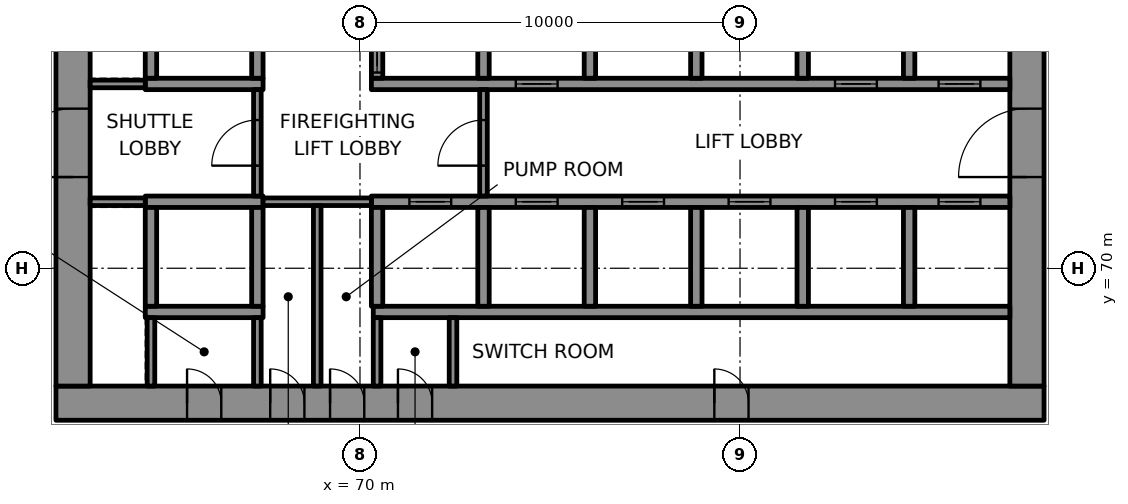
"""IFC4 building model, lengths in metres.
Left out: names, types, materials, properties, quantities, classifications, styles, units other than length and angle.
Written with IfcOpenShell. Run it as: python <this file> out.ifc"""

import sys

from ifc_helpers import new_model, si_unit, direction, frame, frame_2d, origin, place, context, subcontext, project, spatial, rectangle, extrude, element, fill, save


model = new_model("IFC4")
c1 = context("Model", 3, precision=1e-05, world=origin(), true_north=direction((0.0, 1.0)))
c2 = subcontext(c1, "Body", "Model", "MODEL_VIEW")
j1 = project(units=[si_unit("LENGTHUNIT", "METRE"), si_unit("PLANEANGLEUNIT", "RADIAN")], contexts=[c1])
p1 = place(None, origin())
s1 = spatial("IfcSite", under=j1, at=p1, CompositionType="ELEMENT")
p2 = place(p1, origin())
s2 = spatial("IfcBuilding", under=s1, at=p2, CompositionType="ELEMENT")
p3 = place(p2, frame((0.0, 0.0, 107.2)))
s3 = spatial("IfcBuildingStorey", under=s2, at=p3, CompositionType="ELEMENT", Elevation=107.2)
p4 = place(p3, frame((62.0, 66.45, 0.0), z_axis=(0.0, 0.0, 1.0), x_axis=(1.0, 0.0, 0.0)))
e1 = element("IfcWall", 1, at=p4, inside=s3, PredefinedType="SHEAR", context=c2, shape_type="SweptSolid", body=[
    extrude(rectangle(XDim=26.0, YDim=0.9, at=frame_2d((13.0, 0.0))), origin(), (0.0, 0.0, 1.0), 4.0),
])
p5 = place(p4, frame((3.45, 0.0, 0.0)))
e2 = element("IfcOpeningElement", 2, at=p5, cuts=e1, PredefinedType="OPENING", context=c2, shape_type="SweptSolid", body=[
    extrude(rectangle(XDim=0.9, YDim=2.1, at=frame_2d((0.45, 1.05))), frame((0.0, 0.46, 0.0), z_axis=(0.0, -1.0, 0.0), x_axis=(1.0, 0.0, 0.0)), (0.0, 0.0, 1.0), 0.92),
])
p6 = place(p4, frame((5.637, 0.0, 0.0)))
e3 = element("IfcOpeningElement", 3, at=p6, cuts=e1, PredefinedType="OPENING", context=c2, shape_type="SweptSolid", body=[
    extrude(rectangle(XDim=0.9, YDim=2.1, at=frame_2d((0.45, 1.05))), frame((0.0, 0.46, 0.0), z_axis=(0.0, -1.0, 0.0), x_axis=(1.0, 0.0, 0.0)), (0.0, 0.0, 1.0), 0.92),
])
p7 = place(p4, frame((7.212, 0.0, 0.0)))
e4 = element("IfcOpeningElement", 4, at=p7, cuts=e1, PredefinedType="OPENING", context=c2, shape_type="SweptSolid", body=[
    extrude(rectangle(XDim=0.9, YDim=2.1, at=frame_2d((0.45, 1.05))), frame((0.0, 0.46, 0.0), z_axis=(0.0, -1.0, 0.0), x_axis=(1.0, 0.0, 0.0)), (0.0, 0.0, 1.0), 0.92),
])
p8 = place(p4, frame((8.999, 0.0, 0.0)))
e5 = element("IfcOpeningElement", 5, at=p8, cuts=e1, PredefinedType="OPENING", context=c2, shape_type="SweptSolid", body=[
    extrude(rectangle(XDim=0.9, YDim=2.1, at=frame_2d((0.45, 1.05))), frame((0.0, 0.46, 0.0), z_axis=(0.0, -1.0, 0.0), x_axis=(1.0, 0.0, 0.0)), (0.0, 0.0, 1.0), 0.92),
])
p9 = place(p4, frame((17.324, 0.0, 0.0)))
e6 = element("IfcOpeningElement", 6, at=p9, cuts=e1, PredefinedType="OPENING", context=c2, shape_type="SweptSolid", body=[
    extrude(rectangle(XDim=0.9, YDim=2.1, at=frame_2d((0.45, 1.05))), frame((0.0, 0.46, 0.0), z_axis=(0.0, -1.0, 0.0), x_axis=(1.0, 0.0, 0.0)), (0.0, 0.0, 1.0), 0.92),
])
p10 = place(p3, frame((62.45, 66.9, 0.0), z_axis=(0.0, 0.0, 1.0), x_axis=(0.0, 1.0, 0.0)))
e7 = element("IfcWall", 7, at=p10, inside=s3, PredefinedType="SHEAR", context=c2, shape_type="SweptSolid", body=[
    extrude(rectangle(XDim=16.2, YDim=0.9, at=frame_2d((8.1, 0.0))), origin(), (0.0, 0.0, 1.0), 4.0),
])
p11 = place(p10, frame((5.5, 0.0, 0.0)))
e8 = element("IfcOpeningElement", 8, at=p11, cuts=e7, PredefinedType="OPENING", context=c2, shape_type="SweptSolid", body=[
    extrude(rectangle(XDim=1.8, YDim=2.1, at=frame_2d((0.9, 1.05))), frame((0.0, 0.46, 0.0), z_axis=(0.0, -1.0, 0.0), x_axis=(1.0, 0.0, 0.0)), (0.0, 0.0, 1.0), 0.92),
])
p12 = place(p3, frame((87.55, 66.9, 0.0), z_axis=(0.0, 0.0, 1.0), x_axis=(0.0, 1.0, 0.0)))
e9 = element("IfcWall", 9, at=p12, inside=s3, PredefinedType="SHEAR", context=c2, shape_type="SweptSolid", body=[
    extrude(rectangle(XDim=16.2, YDim=0.9, at=frame_2d((8.1, 0.0))), origin(), (0.0, 0.0, 1.0), 4.0),
])
p13 = place(p12, frame((5.5, 0.0, 0.0)))
e10 = element("IfcOpeningElement", 10, at=p13, cuts=e9, PredefinedType="OPENING", context=c2, shape_type="SweptSolid", body=[
    extrude(rectangle(XDim=1.8, YDim=2.1, at=frame_2d((0.9, 1.05))), frame((0.0, 0.46, 0.0), z_axis=(0.0, -1.0, 0.0), x_axis=(1.0, 0.0, 0.0)), (0.0, 0.0, 1.0), 0.92),
])
p14 = place(p12, frame((11.202, 0.0, 0.0)))
e11 = element("IfcOpeningElement", 11, at=p14, cuts=e9, PredefinedType="OPENING", context=c2, shape_type="SweptSolid", body=[
    extrude(rectangle(XDim=0.9, YDim=2.1, at=frame_2d((0.45, 1.05))), frame((0.0, 0.46, 0.0), z_axis=(0.0, -1.0, 0.0), x_axis=(1.0, 0.0, 0.0)), (0.0, 0.0, 1.0), 0.92),
])
p15 = place(p3, frame((64.35, 68.85, 0.0), z_axis=(0.0, 0.0, 1.0), x_axis=(1.0, 0.0, 0.0)))
e12 = element("IfcWall", 12, at=p15, inside=s3, PredefinedType="SHEAR", context=c2, shape_type="SweptSolid", body=[
    extrude(rectangle(XDim=3.1, YDim=0.3, at=frame_2d((1.55, 0.0))), origin(), (0.0, 0.0, 1.0), 4.0),
])
p16 = place(p3, frame((70.35, 68.85, 0.0), z_axis=(0.0, 0.0, 1.0), x_axis=(1.0, 0.0, 0.0)))
e13 = element("IfcWall", 13, at=p16, inside=s3, PredefinedType="SHEAR", context=c2, shape_type="SweptSolid", body=[
    extrude(rectangle(XDim=16.75, YDim=0.3, at=frame_2d((8.375, 0.0))), origin(), (0.0, 0.0, 1.0), 4.0),
])
p17 = place(p3, frame((64.35, 71.75, 0.0), z_axis=(0.0, 0.0, 1.0), x_axis=(1.0, 0.0, 0.0)))
e14 = element("IfcWall", 14, at=p17, inside=s3, PredefinedType="SHEAR", context=c2, shape_type="SweptSolid", body=[
    extrude(rectangle(XDim=3.1, YDim=0.3, at=frame_2d((1.55, 0.0))), origin(), (0.0, 0.0, 1.0), 4.0),
])
p18 = place(p3, frame((70.3, 71.75, 0.0), z_axis=(0.0, 0.0, 1.0), x_axis=(1.0, 0.0, 0.0)))
e15 = element("IfcWall", 15, at=p18, inside=s3, PredefinedType="SHEAR", context=c2, shape_type="SweptSolid", body=[
    extrude(rectangle(XDim=16.8, YDim=0.3, at=frame_2d((8.4, 0.0))), origin(), (0.0, 0.0, 1.0), 4.0),
])
p19 = place(p18, frame((1.0, 0.0, 0.0)))
e16 = element("IfcOpeningElement", 16, at=p19, cuts=e15, PredefinedType="OPENING", context=c2, shape_type="SweptSolid", body=[
    extrude(rectangle(XDim=1.1, YDim=2.1, at=frame_2d((0.55, 1.05))), frame((0.0, 0.16, 0.0), z_axis=(0.0, -1.0, 0.0), x_axis=(1.0, 0.0, 0.0)), (0.0, 0.0, 1.0), 0.32),
])
p20 = place(p18, frame((3.8, 0.0, 0.0)))
e17 = element("IfcOpeningElement", 17, at=p20, cuts=e15, PredefinedType="OPENING", context=c2, shape_type="SweptSolid", body=[
    extrude(rectangle(XDim=1.1, YDim=2.1, at=frame_2d((0.55, 1.05))), frame((0.0, 0.16, 0.0), z_axis=(0.0, -1.0, 0.0), x_axis=(1.0, 0.0, 0.0)), (0.0, 0.0, 1.0), 0.32),
])
p21 = place(p18, frame((6.6, 0.0, 0.0)))
e18 = element("IfcOpeningElement", 18, at=p21, cuts=e15, PredefinedType="OPENING", context=c2, shape_type="SweptSolid", body=[
    extrude(rectangle(XDim=1.1, YDim=2.1, at=frame_2d((0.55, 1.05))), frame((0.0, 0.16, 0.0), z_axis=(0.0, -1.0, 0.0), x_axis=(1.0, 0.0, 0.0)), (0.0, 0.0, 1.0), 0.32),
])
p22 = place(p18, frame((9.4, 0.0, 0.0)))
e19 = element("IfcOpeningElement", 19, at=p22, cuts=e15, PredefinedType="OPENING", context=c2, shape_type="SweptSolid", body=[
    extrude(rectangle(XDim=1.1, YDim=2.1, at=frame_2d((0.55, 1.05))), frame((0.0, 0.16, 0.0), z_axis=(0.0, -1.0, 0.0), x_axis=(1.0, 0.0, 0.0)), (0.0, 0.0, 1.0), 0.32),
])
p23 = place(p18, frame((12.2, 0.0, 0.0)))
e20 = element("IfcOpeningElement", 20, at=p23, cuts=e15, PredefinedType="OPENING", context=c2, shape_type="SweptSolid", body=[
    extrude(rectangle(XDim=1.1, YDim=2.1, at=frame_2d((0.55, 1.05))), frame((0.0, 0.16, 0.0), z_axis=(0.0, -1.0, 0.0), x_axis=(1.0, 0.0, 0.0)), (0.0, 0.0, 1.0), 0.32),
])
p24 = place(p18, frame((14.925, 0.0, 0.0)))
e21 = element("IfcOpeningElement", 21, at=p24, cuts=e15, PredefinedType="OPENING", context=c2, shape_type="SweptSolid", body=[
    extrude(rectangle(XDim=1.1, YDim=2.1, at=frame_2d((0.55, 1.05))), frame((0.0, 0.16, 0.0), z_axis=(0.0, -1.0, 0.0), x_axis=(1.0, 0.0, 0.0)), (0.0, 0.0, 1.0), 0.32),
])
p25 = place(p3, frame((64.35, 74.85, 0.0), z_axis=(0.0, 0.0, 1.0), x_axis=(1.0, 0.0, 0.0)))
e22 = element("IfcWall", 22, at=p25, inside=s3, PredefinedType="SHEAR", context=c2, shape_type="SweptSolid", body=[
    extrude(rectangle(XDim=3.1, YDim=0.3, at=frame_2d((1.55, 0.0))), origin(), (0.0, 0.0, 1.0), 4.0),
])
p26 = place(p3, frame((70.3, 74.85, 0.0), z_axis=(0.0, 0.0, 1.0), x_axis=(1.0, 0.0, 0.0)))
e23 = element("IfcWall", 23, at=p26, inside=s3, PredefinedType="SHEAR", context=c2, shape_type="SweptSolid", body=[
    extrude(rectangle(XDim=16.8, YDim=0.3, at=frame_2d((8.4, 0.0))), origin(), (0.0, 0.0, 1.0), 4.0),
])
p27 = place(p26, frame((3.8, 0.0, 0.0)))
e24 = element("IfcOpeningElement", 24, at=p27, cuts=e23, PredefinedType="OPENING", context=c2, shape_type="SweptSolid", body=[
    extrude(rectangle(XDim=1.1, YDim=2.1, at=frame_2d((0.55, 1.05))), frame((0.0, 0.16, 0.0), z_axis=(0.0, -1.0, 0.0), x_axis=(1.0, 0.0, 0.0)), (0.0, 0.0, 1.0), 0.32),
])
p28 = place(p26, frame((12.2, 0.0, 0.0)))
e25 = element("IfcOpeningElement", 25, at=p28, cuts=e23, PredefinedType="OPENING", context=c2, shape_type="SweptSolid", body=[
    extrude(rectangle(XDim=1.1, YDim=2.1, at=frame_2d((0.55, 1.05))), frame((0.0, 0.16, 0.0), z_axis=(0.0, -1.0, 0.0), x_axis=(1.0, 0.0, 0.0)), (0.0, 0.0, 1.0), 0.32),
])
p29 = place(p26, frame((14.925, 0.0, 0.0)))
e26 = element("IfcOpeningElement", 26, at=p29, cuts=e23, PredefinedType="OPENING", context=c2, shape_type="SweptSolid", body=[
    extrude(rectangle(XDim=1.1, YDim=2.1, at=frame_2d((0.55, 1.05))), frame((0.0, 0.16, 0.0), z_axis=(0.0, -1.0, 0.0), x_axis=(1.0, 0.0, 0.0)), (0.0, 0.0, 1.0), 0.32),
])
for number, where, z_axis, x_axis in (
    (27, (64.5, 69.0, 0.0), (0.0, 0.0, 1.0), (0.0, 1.0, 0.0)),
    (28, (64.5, 75.0, 0.0), (0.0, 0.0, 1.0), (0.0, 1.0, 0.0)),
    (29, (67.3, 69.0, 0.0), (0.0, 0.0, 1.0), (0.0, 1.0, 0.0)),
    (30, (67.3, 75.0, 0.0), (0.0, 0.0, 1.0), (0.0, 1.0, 0.0)),
    (31, (70.45, 69.0, 0.0), (0.0, 0.0, 1.0), (0.0, 1.0, 0.0)),
):
    element("IfcWall", number, at=place(p3, frame(where, z_axis=z_axis, x_axis=x_axis)), inside=s3, PredefinedType="SHEAR", context=c2, shape_type="SweptSolid", body=[
        extrude(rectangle(XDim=2.6, YDim=0.3, at=frame_2d((1.3, 0.0))), origin(), (0.0, 0.0, 1.0), 4.0),
    ])
p30 = place(p3, frame((70.45, 75.0, 0.0), z_axis=(0.0, 0.0, 1.0), x_axis=(0.0, 1.0, 0.0)))
e32 = element("IfcWall", 32, at=p30, inside=s3, PredefinedType="SHEAR", context=c2, shape_type="SweptSolid", body=[
    extrude(rectangle(XDim=2.6, YDim=0.3, at=frame_2d((1.3, 0.0))), origin(), (0.0, 0.0, 1.0), 4.0),
])
p31 = place(p30, frame((0.15, 0.0, 0.0)))
e33 = element("IfcOpeningElement", 33, at=p31, cuts=e32, PredefinedType="OPENING", context=c2, shape_type="SweptSolid", body=[
    extrude(rectangle(XDim=1.1, YDim=2.1, at=frame_2d((0.55, 1.05))), frame((0.0, 0.16, 0.0), z_axis=(0.0, -1.0, 0.0), x_axis=(1.0, 0.0, 0.0)), (0.0, 0.0, 1.0), 0.32),
])
for number, where, z_axis, x_axis in (
    (34, (73.25, 69.0, 0.0), (0.0, 0.0, 1.0), (0.0, 1.0, 0.0)),
    (35, (73.25, 75.0, 0.0), (0.0, 0.0, 1.0), (0.0, 1.0, 0.0)),
    (36, (76.05, 69.0, 0.0), (0.0, 0.0, 1.0), (0.0, 1.0, 0.0)),
    (37, (76.05, 75.0, 0.0), (0.0, 0.0, 1.0), (0.0, 1.0, 0.0)),
    (38, (78.85, 69.0, 0.0), (0.0, 0.0, 1.0), (0.0, 1.0, 0.0)),
    (39, (78.85, 75.0, 0.0), (0.0, 0.0, 1.0), (0.0, 1.0, 0.0)),
    (40, (81.65, 69.0, 0.0), (0.0, 0.0, 1.0), (0.0, 1.0, 0.0)),
    (41, (81.65, 75.0, 0.0), (0.0, 0.0, 1.0), (0.0, 1.0, 0.0)),
    (42, (84.45, 69.0, 0.0), (0.0, 0.0, 1.0), (0.0, 1.0, 0.0)),
    (43, (84.45, 75.0, 0.0), (0.0, 0.0, 1.0), (0.0, 1.0, 0.0)),
):
    element("IfcWall", number, at=place(p3, frame(where, z_axis=z_axis, x_axis=x_axis)), inside=s3, PredefinedType="SHEAR", context=c2, shape_type="SweptSolid", body=[
        extrude(rectangle(XDim=2.6, YDim=0.3, at=frame_2d((1.3, 0.0))), origin(), (0.0, 0.0, 1.0), 4.0),
    ])
p32 = place(p3, frame((62.9, 71.75, 0.0), z_axis=(0.0, 0.0, 1.0), x_axis=(1.0, 0.0, 0.0)))
e44 = element("IfcWall", 44, at=p32, inside=s3, PredefinedType="PARTITIONING", context=c2, shape_type="SweptSolid", body=[
    extrude(rectangle(XDim=1.45, YDim=0.2, at=frame_2d((0.725, 0.0))), origin(), (0.0, 0.0, 1.0), 4.0),
])
p33 = place(p3, frame((67.45, 71.75, 0.0), z_axis=(0.0, 0.0, 1.0), x_axis=(1.0, 0.0, 0.0)))
e45 = element("IfcWall", 45, at=p33, inside=s3, PredefinedType="PARTITIONING", context=c2, shape_type="SweptSolid", body=[
    extrude(rectangle(XDim=2.85, YDim=0.2, at=frame_2d((1.425, 0.0))), origin(), (0.0, 0.0, 1.0), 4.0),
])
p34 = place(p3, frame((62.9, 74.85, 0.0), z_axis=(0.0, 0.0, 1.0), x_axis=(1.0, 0.0, 0.0)))
e46 = element("IfcWall", 46, at=p34, inside=s3, PredefinedType="PARTITIONING", context=c2, shape_type="SweptSolid", body=[
    extrude(rectangle(XDim=1.45, YDim=0.2, at=frame_2d((0.725, 0.0))), origin(), (0.0, 0.0, 1.0), 4.0),
])
for number, where, z_axis, x_axis in (
    (47, (64.5, 66.9, 0.0), (0.0, 0.0, 1.0), (0.0, 1.0, 0.0)),
    (48, (67.3, 66.9, 0.0), (0.0, 0.0, 1.0), (0.0, 1.0, 0.0)),
):
    element("IfcWall", number, at=place(p3, frame(where, z_axis=z_axis, x_axis=x_axis)), inside=s3, PredefinedType="PARTITIONING", context=c2, shape_type="SweptSolid", body=[
        extrude(rectangle(XDim=1.8, YDim=0.2, at=frame_2d((0.9, 0.0))), origin(), (0.0, 0.0, 1.0), 4.0),
    ])
p35 = place(p3, frame((67.3, 71.9, 0.0), z_axis=(0.0, 0.0, 1.0), x_axis=(0.0, 1.0, 0.0)))
e49 = element("IfcWall", 49, at=p35, inside=s3, PredefinedType="PARTITIONING", context=c2, shape_type="SweptSolid", body=[
    extrude(rectangle(XDim=2.8, YDim=0.2, at=frame_2d((1.4, 0.0))), origin(), (0.0, 0.0, 1.0), 4.0),
])
p36 = place(p35, frame((0.8, 0.0, 0.0)))
e50 = element("IfcOpeningElement", 50, at=p36, cuts=e49, PredefinedType="OPENING", context=c2, shape_type="SweptSolid", body=[
    extrude(rectangle(XDim=1.2, YDim=2.1, at=frame_2d((0.6, 1.05))), frame((0.0, 0.11, 0.0), z_axis=(0.0, -1.0, 0.0), x_axis=(1.0, 0.0, 0.0)), (0.0, 0.0, 1.0), 0.22),
])
p37 = place(p3, frame((68.875, 66.9, 0.0), z_axis=(0.0, 0.0, 1.0), x_axis=(0.0, 1.0, 0.0)))
e51 = element("IfcWall", 51, at=p37, inside=s3, PredefinedType="PARTITIONING", context=c2, shape_type="SweptSolid", body=[
    extrude(rectangle(XDim=4.75, YDim=0.2, at=frame_2d((2.375, 0.0))), origin(), (0.0, 0.0, 1.0), 4.0),
])
for number, where, z_axis, x_axis in (
    (52, (70.45, 66.9, 0.0), (0.0, 0.0, 1.0), (0.0, 1.0, 0.0)),
    (53, (72.448, 66.9, 0.0), (0.0, 0.0, 1.0), (0.0, 1.0, 0.0)),
):
    element("IfcWall", number, at=place(p3, frame(where, z_axis=z_axis, x_axis=x_axis)), inside=s3, PredefinedType="PARTITIONING", context=c2, shape_type="SweptSolid", body=[
        extrude(rectangle(XDim=1.8, YDim=0.2, at=frame_2d((0.9, 0.0))), origin(), (0.0, 0.0, 1.0), 4.0),
    ])
p38 = place(p3, frame((73.25, 71.9, 0.0), z_axis=(0.0, 0.0, 1.0), x_axis=(0.0, 1.0, 0.0)))
e54 = element("IfcWall", 54, at=p38, inside=s3, PredefinedType="PARTITIONING", context=c2, shape_type="SweptSolid", body=[
    extrude(rectangle(XDim=2.8, YDim=0.2, at=frame_2d((1.4, 0.0))), origin(), (0.0, 0.0, 1.0), 4.0),
])
p39 = place(p38, frame((0.8, 0.0, 0.0)))
e55 = element("IfcOpeningElement", 55, at=p39, cuts=e54, PredefinedType="OPENING", context=c2, shape_type="SweptSolid", body=[
    extrude(rectangle(XDim=1.2, YDim=2.1, at=frame_2d((0.6, 1.05))), frame((0.0, 0.11, 0.0), z_axis=(0.0, -1.0, 0.0), x_axis=(1.0, 0.0, 0.0)), (0.0, 0.0, 1.0), 0.22),
])
p40 = place(p19, origin())
e56 = element("IfcDoor", 56, at=p40, inside=s3, OperationType="DOUBLE_DOOR_SLIDING", PredefinedType="DOOR", context=c2, shape_type="SweptSolid", body=[
    extrude(rectangle(XDim=1.1, YDim=2.1, at=frame_2d((0.55, 1.05))), frame((0.0, 0.025, 0.0), z_axis=(0.0, -1.0, 0.0), x_axis=(1.0, 0.0, 0.0)), (0.0, 0.0, 1.0), 0.05),
])
fill(e16, e56)
p41 = place(p20, origin())
e57 = element("IfcDoor", 57, at=p41, inside=s3, OperationType="DOUBLE_DOOR_SLIDING", PredefinedType="DOOR", context=c2, shape_type="SweptSolid", body=[
    extrude(rectangle(XDim=1.1, YDim=2.1, at=frame_2d((0.55, 1.05))), frame((0.0, 0.025, 0.0), z_axis=(0.0, -1.0, 0.0), x_axis=(1.0, 0.0, 0.0)), (0.0, 0.0, 1.0), 0.05),
])
fill(e17, e57)
p42 = place(p21, origin())
e58 = element("IfcDoor", 58, at=p42, inside=s3, OperationType="DOUBLE_DOOR_SLIDING", PredefinedType="DOOR", context=c2, shape_type="SweptSolid", body=[
    extrude(rectangle(XDim=1.1, YDim=2.1, at=frame_2d((0.55, 1.05))), frame((0.0, 0.025, 0.0), z_axis=(0.0, -1.0, 0.0), x_axis=(1.0, 0.0, 0.0)), (0.0, 0.0, 1.0), 0.05),
])
fill(e18, e58)
p43 = place(p22, origin())
e59 = element("IfcDoor", 59, at=p43, inside=s3, OperationType="DOUBLE_DOOR_SLIDING", PredefinedType="DOOR", context=c2, shape_type="SweptSolid", body=[
    extrude(rectangle(XDim=1.1, YDim=2.1, at=frame_2d((0.55, 1.05))), frame((0.0, 0.025, 0.0), z_axis=(0.0, -1.0, 0.0), x_axis=(1.0, 0.0, 0.0)), (0.0, 0.0, 1.0), 0.05),
])
fill(e19, e59)
p44 = place(p23, origin())
e60 = element("IfcDoor", 60, at=p44, inside=s3, OperationType="DOUBLE_DOOR_SLIDING", PredefinedType="DOOR", context=c2, shape_type="SweptSolid", body=[
    extrude(rectangle(XDim=1.1, YDim=2.1, at=frame_2d((0.55, 1.05))), frame((0.0, 0.025, 0.0), z_axis=(0.0, -1.0, 0.0), x_axis=(1.0, 0.0, 0.0)), (0.0, 0.0, 1.0), 0.05),
])
fill(e20, e60)
p45 = place(p24, origin())
e61 = element("IfcDoor", 61, at=p45, inside=s3, OperationType="DOUBLE_DOOR_SLIDING", PredefinedType="DOOR", context=c2, shape_type="SweptSolid", body=[
    extrude(rectangle(XDim=1.1, YDim=2.1, at=frame_2d((0.55, 1.05))), frame((0.0, 0.025, 0.0), z_axis=(0.0, -1.0, 0.0), x_axis=(1.0, 0.0, 0.0)), (0.0, 0.0, 1.0), 0.05),
])
fill(e21, e61)
p46 = place(p31, origin())
e62 = element("IfcDoor", 62, at=p46, inside=s3, OperationType="DOUBLE_DOOR_SLIDING", PredefinedType="DOOR", context=c2, shape_type="SweptSolid", body=[
    extrude(rectangle(XDim=1.1, YDim=2.1, at=frame_2d((0.55, 1.05))), frame((0.0, 0.025, 0.0), z_axis=(0.0, -1.0, 0.0), x_axis=(1.0, 0.0, 0.0)), (0.0, 0.0, 1.0), 0.05),
])
fill(e33, e62)
p47 = place(p27, origin())
e63 = element("IfcDoor", 63, at=p47, inside=s3, OperationType="DOUBLE_DOOR_SLIDING", PredefinedType="DOOR", context=c2, shape_type="SweptSolid", body=[
    extrude(rectangle(XDim=1.1, YDim=2.1, at=frame_2d((0.55, 1.05))), frame((0.0, 0.025, 0.0), z_axis=(0.0, -1.0, 0.0), x_axis=(1.0, 0.0, 0.0)), (0.0, 0.0, 1.0), 0.05),
])
fill(e24, e63)
p48 = place(p28, origin())
e64 = element("IfcDoor", 64, at=p48, inside=s3, OperationType="DOUBLE_DOOR_SLIDING", PredefinedType="DOOR", context=c2, shape_type="SweptSolid", body=[
    extrude(rectangle(XDim=1.1, YDim=2.1, at=frame_2d((0.55, 1.05))), frame((0.0, 0.025, 0.0), z_axis=(0.0, -1.0, 0.0), x_axis=(1.0, 0.0, 0.0)), (0.0, 0.0, 1.0), 0.05),
])
fill(e25, e64)
p49 = place(p29, origin())
e65 = element("IfcDoor", 65, at=p49, inside=s3, OperationType="DOUBLE_DOOR_SLIDING", PredefinedType="DOOR", context=c2, shape_type="SweptSolid", body=[
    extrude(rectangle(XDim=1.1, YDim=2.1, at=frame_2d((0.55, 1.05))), frame((0.0, 0.025, 0.0), z_axis=(0.0, -1.0, 0.0), x_axis=(1.0, 0.0, 0.0)), (0.0, 0.0, 1.0), 0.05),
])
fill(e26, e65)
p50 = place(p39, origin())
e66 = element("IfcDoor", 66, at=p50, inside=s3, OperationType="SINGLE_SWING_LEFT", PredefinedType="DOOR", context=c2, shape_type="SweptSolid", body=[
    extrude(rectangle(XDim=1.2, YDim=2.1, at=frame_2d((0.6, 1.05))), frame((0.0, 0.025, 0.0), z_axis=(0.0, -1.0, 0.0), x_axis=(1.0, 0.0, 0.0)), (0.0, 0.0, 1.0), 0.05),
])
fill(e55, e66)
p51 = place(p36, origin())
e67 = element("IfcDoor", 67, at=p51, inside=s3, OperationType="SINGLE_SWING_RIGHT", PredefinedType="DOOR", context=c2, shape_type="SweptSolid", body=[
    extrude(rectangle(XDim=1.2, YDim=2.1, at=frame_2d((0.6, 1.05))), frame((0.0, 0.025, 0.0), z_axis=(0.0, -1.0, 0.0), x_axis=(1.0, 0.0, 0.0)), (0.0, 0.0, 1.0), 0.05),
])
fill(e50, e67)
p52 = place(p11, origin())
e68 = element("IfcDoor", 68, at=p52, inside=s3, OperationType="SINGLE_SWING_LEFT", PredefinedType="DOOR", context=c2, shape_type="SweptSolid", body=[
    extrude(rectangle(XDim=1.8, YDim=2.1, at=frame_2d((0.9, 1.05))), frame((0.0, 0.17, 0.0), z_axis=(0.0, -1.0, 0.0), x_axis=(1.0, 0.0, 0.0)), (0.0, 0.0, 1.0), 0.34),
])
fill(e8, e68)
p53 = place(p13, origin())
e69 = element("IfcDoor", 69, at=p53, inside=s3, OperationType="SINGLE_SWING_RIGHT", PredefinedType="DOOR", context=c2, shape_type="SweptSolid", body=[
    extrude(rectangle(XDim=1.8, YDim=2.1, at=frame_2d((0.9, 1.05))), frame((0.0, 0.17, 0.0), z_axis=(0.0, -1.0, 0.0), x_axis=(1.0, 0.0, 0.0)), (0.0, 0.0, 1.0), 0.34),
])
fill(e10, e69)
p54 = place(p5, origin())
e70 = element("IfcDoor", 70, at=p54, inside=s3, OperationType="SINGLE_SWING_LEFT", PredefinedType="DOOR", context=c2, shape_type="SweptSolid", body=[
    extrude(rectangle(XDim=0.9, YDim=2.1, at=frame_2d((0.45, 1.05))), frame((0.0, 0.17, 0.0), z_axis=(0.0, -1.0, 0.0), x_axis=(1.0, 0.0, 0.0)), (0.0, 0.0, 1.0), 0.34),
])
fill(e2, e70)
p55 = place(p6, origin())
e71 = element("IfcDoor", 71, at=p55, inside=s3, OperationType="SINGLE_SWING_RIGHT", PredefinedType="DOOR", context=c2, shape_type="SweptSolid", body=[
    extrude(rectangle(XDim=0.9, YDim=2.1, at=frame_2d((0.45, 1.05))), frame((0.0, 0.17, 0.0), z_axis=(0.0, -1.0, 0.0), x_axis=(1.0, 0.0, 0.0)), (0.0, 0.0, 1.0), 0.34),
])
fill(e3, e71)
p56 = place(p7, origin())
e72 = element("IfcDoor", 72, at=p56, inside=s3, OperationType="SINGLE_SWING_LEFT", PredefinedType="DOOR", context=c2, shape_type="SweptSolid", body=[
    extrude(rectangle(XDim=0.9, YDim=2.1, at=frame_2d((0.45, 1.05))), frame((0.0, 0.17, 0.0), z_axis=(0.0, -1.0, 0.0), x_axis=(1.0, 0.0, 0.0)), (0.0, 0.0, 1.0), 0.34),
])
fill(e4, e72)
p57 = place(p8, origin())
e73 = element("IfcDoor", 73, at=p57, inside=s3, OperationType="SINGLE_SWING_RIGHT", PredefinedType="DOOR", context=c2, shape_type="SweptSolid", body=[
    extrude(rectangle(XDim=0.9, YDim=2.1, at=frame_2d((0.45, 1.05))), frame((0.0, 0.17, 0.0), z_axis=(0.0, -1.0, 0.0), x_axis=(1.0, 0.0, 0.0)), (0.0, 0.0, 1.0), 0.34),
])
fill(e5, e73)
p58 = place(p9, origin())
e74 = element("IfcDoor", 74, at=p58, inside=s3, OperationType="SINGLE_SWING_LEFT", PredefinedType="DOOR", context=c2, shape_type="SweptSolid", body=[
    extrude(rectangle(XDim=0.9, YDim=2.1, at=frame_2d((0.45, 1.05))), frame((0.0, 0.17, 0.0), z_axis=(0.0, -1.0, 0.0), x_axis=(1.0, 0.0, 0.0)), (0.0, 0.0, 1.0), 0.34),
])
fill(e6, e74)
save(model, sys.argv[1])
